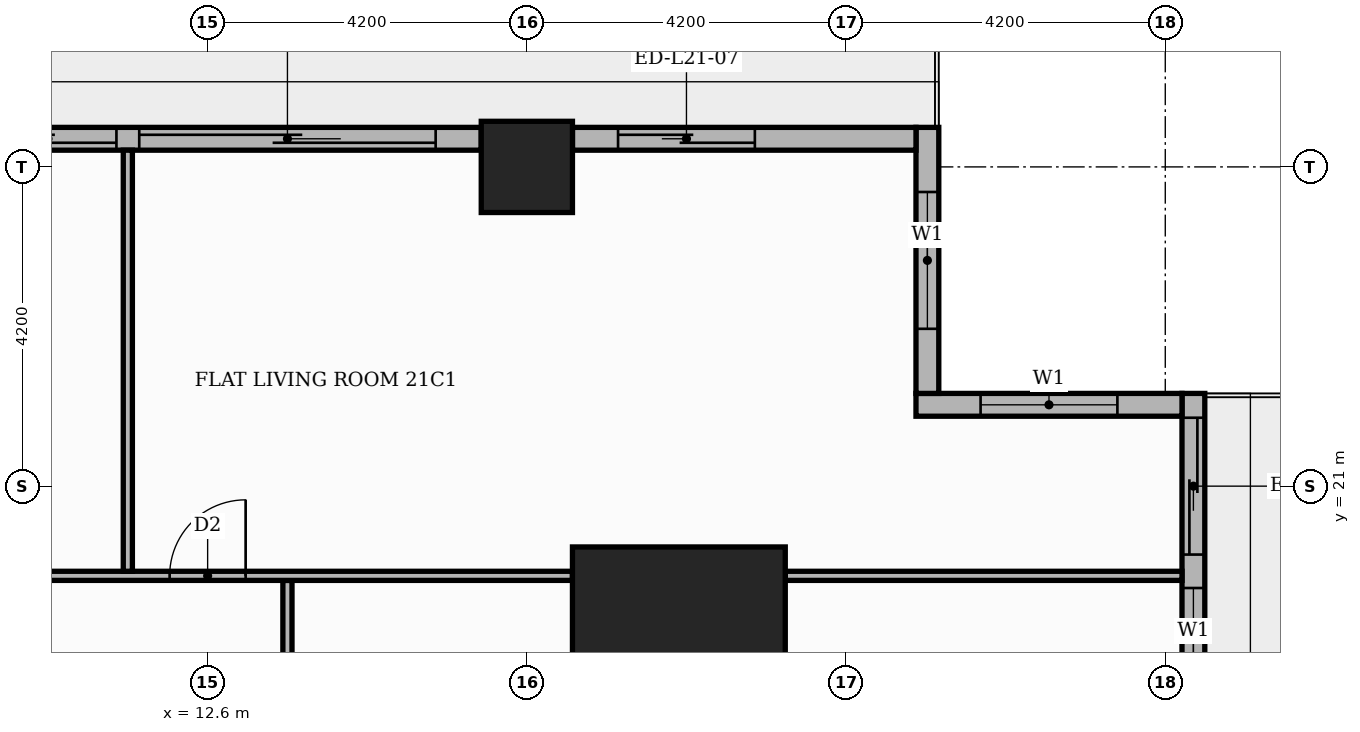
"""IFC4 building model, lengths in metres.
Left out: names, types, materials, properties, quantities, classifications, styles, units other than length and angle.
Written with IfcOpenShell. Run it as: python <this file> out.ifc"""

import sys

from ifc_helpers import new_model, si_unit, direction, frame, frame_2d, origin, origin_2d, place, context, subcontext, project, spatial, rectangle, extrude, element, fill, save


model = new_model("IFC4")
c1 = context("Model", 3, precision=1e-05, world=origin(), true_north=direction((0.0, 1.0)))
c2 = subcontext(c1, "Body", "Model", "MODEL_VIEW")
j1 = project(units=[si_unit("LENGTHUNIT", "METRE"), si_unit("PLANEANGLEUNIT", "RADIAN")], contexts=[c1])
p1 = place(None, origin())
s1 = spatial("IfcSite", under=j1, at=p1, CompositionType="ELEMENT")
p2 = place(p1, origin())
s2 = spatial("IfcBuilding", under=s1, at=p2, CompositionType="ELEMENT")
p3 = place(p2, frame((0.0, 0.0, 90.9)))
s3 = spatial("IfcBuildingStorey", under=s2, at=p3, CompositionType="ELEMENT", Elevation=90.9)
p4 = place(p3, frame((18.8, 18.8, 0.0), z_axis=(0.0, 0.0, 1.0), x_axis=(1.0, 0.0, 0.0)))
e1 = element("IfcColumn", 1, at=p4, inside=s3, PredefinedType="COLUMN", context=c2, shape_type="SweptSolid", body=[
    extrude(rectangle(XDim=2.8, YDim=2.8, at=origin_2d()), origin(), (0.0, 0.0, 1.0), 3.9),
])
p5 = place(p3, frame((16.8, 25.2, 0.0), z_axis=(0.0, 0.0, 1.0), x_axis=(1.0, 0.0, 0.0)))
e2 = element("IfcColumn", 2, at=p5, inside=s3, PredefinedType="COLUMN", context=c2, shape_type="SweptSolid", body=[
    extrude(rectangle(XDim=1.2, YDim=1.2, at=origin_2d()), origin(), (0.0, 0.0, 1.0), 3.9),
])
p6 = place(p3, frame((25.57, 17.4, 0.0), z_axis=(0.0, 0.0, 1.0), x_axis=(0.0, 1.0, 0.0)))
e3 = element("IfcWall", 3, at=p6, inside=s3, PredefinedType="STANDARD", context=c2, shape_type="SweptSolid", body=[
    extrude(rectangle(XDim=4.82, YDim=0.3, at=frame_2d((2.41, 0.0))), origin(), (0.0, 0.0, 1.0), 3.48),
])
p7 = place(p6, frame((2.7, 0.0, 0.0)))
e4 = element("IfcOpeningElement", 4, at=p7, cuts=e3, PredefinedType="OPENING", context=c2, shape_type="SweptSolid", body=[
    extrude(rectangle(XDim=1.8, YDim=2.4, at=frame_2d((0.9, 1.2))), frame((0.0, 0.16, 0.0), z_axis=(0.0, -1.0, 0.0), x_axis=(1.0, 0.0, 0.0)), (0.0, 0.0, 1.0), 0.32),
])
p8 = place(p6, frame((0.46, 0.0, 0.9)))
e5 = element("IfcOpeningElement", 5, at=p8, cuts=e3, PredefinedType="OPENING", context=c2, shape_type="SweptSolid", body=[
    extrude(rectangle(XDim=1.8, YDim=2.1, at=frame_2d((0.9, 1.05))), frame((0.0, 0.16, 0.0), z_axis=(0.0, -1.0, 0.0), x_axis=(1.0, 0.0, 0.0)), (0.0, 0.0, 1.0), 0.32),
])
p9 = place(p3, frame((25.42, 22.07, 0.0), z_axis=(0.0, 0.0, 1.0), x_axis=(-1.0, 0.0, 0.0)))
e6 = element("IfcWall", 6, at=p9, inside=s3, PredefinedType="STANDARD", context=c2, shape_type="SweptSolid", body=[
    extrude(rectangle(XDim=3.5, YDim=0.3, at=frame_2d((1.75, 0.0))), origin(), (0.0, 0.0, 1.0), 3.48),
])
p10 = place(p9, frame((0.85, 0.0, 0.9)))
e7 = element("IfcOpeningElement", 7, at=p10, cuts=e6, PredefinedType="OPENING", context=c2, shape_type="SweptSolid", body=[
    extrude(rectangle(XDim=1.8, YDim=2.1, at=frame_2d((0.9, 1.05))), frame((0.0, 0.16, 0.0), z_axis=(0.0, -1.0, 0.0), x_axis=(1.0, 0.0, 0.0)), (0.0, 0.0, 1.0), 0.32),
])
p11 = place(p3, frame((22.07, 22.22, 0.0), z_axis=(0.0, 0.0, 1.0), x_axis=(0.0, 1.0, 0.0)))
e8 = element("IfcWall", 8, at=p11, inside=s3, PredefinedType="STANDARD", context=c2, shape_type="SweptSolid", body=[
    extrude(rectangle(XDim=3.5, YDim=0.3, at=frame_2d((1.75, 0.0))), origin(), (0.0, 0.0, 1.0), 3.48),
])
p12 = place(p11, frame((0.85, 0.0, 0.9)))
e9 = element("IfcOpeningElement", 9, at=p12, cuts=e8, PredefinedType="OPENING", context=c2, shape_type="SweptSolid", body=[
    extrude(rectangle(XDim=1.8, YDim=2.1, at=frame_2d((0.9, 1.05))), frame((0.0, 0.16, 0.0), z_axis=(0.0, -1.0, 0.0), x_axis=(1.0, 0.0, 0.0)), (0.0, 0.0, 1.0), 0.32),
])
p13 = place(p3, frame((21.92, 25.57, 0.0), z_axis=(0.0, 0.0, 1.0), x_axis=(-1.0, 0.0, 0.0)))
e10 = element("IfcWall", 10, at=p13, inside=s3, PredefinedType="STANDARD", context=c2, shape_type="SweptSolid", body=[
    extrude(rectangle(XDim=4.52, YDim=0.3, at=frame_2d((2.26, 0.0))), origin(), (0.0, 0.0, 1.0), 3.48),
])
p14 = place(p13, frame((2.12, 0.0, 0.0)))
e11 = element("IfcOpeningElement", 11, at=p14, cuts=e10, PredefinedType="OPENING", context=c2, shape_type="SweptSolid", body=[
    extrude(rectangle(XDim=1.8, YDim=2.4, at=frame_2d((0.9, 1.2))), frame((0.0, 0.16, 0.0), z_axis=(0.0, -1.0, 0.0), x_axis=(1.0, 0.0, 0.0)), (0.0, 0.0, 1.0), 0.32),
])
p15 = place(p3, frame((16.2, 25.57, 0.0), z_axis=(0.0, 0.0, 1.0), x_axis=(-1.0, 0.0, 0.0)))
e12 = element("IfcWall", 12, at=p15, inside=s3, PredefinedType="STANDARD", context=c2, shape_type="SweptSolid", body=[
    extrude(rectangle(XDim=7.2, YDim=0.3, at=frame_2d((3.6, 0.0))), origin(), (0.0, 0.0, 1.0), 3.48),
])
p16 = place(p15, frame((0.6, 0.0, 0.0)))
e13 = element("IfcOpeningElement", 13, at=p16, cuts=e12, PredefinedType="OPENING", context=c2, shape_type="SweptSolid", body=[
    extrude(rectangle(XDim=3.9, YDim=2.4, at=frame_2d((1.95, 1.2))), frame((0.0, 0.16, 0.0), z_axis=(0.0, -1.0, 0.0), x_axis=(1.0, 0.0, 0.0)), (0.0, 0.0, 1.0), 0.32),
])
p17 = place(p15, frame((4.8, 0.0, 0.0)))
e14 = element("IfcOpeningElement", 14, at=p17, cuts=e12, PredefinedType="OPENING", context=c2, shape_type="SweptSolid", body=[
    extrude(rectangle(XDim=1.8, YDim=2.4, at=frame_2d((0.9, 1.2))), frame((0.0, 0.16, 0.0), z_axis=(0.0, -1.0, 0.0), x_axis=(1.0, 0.0, 0.0)), (0.0, 0.0, 1.0), 0.32),
])
p18 = place(p3, frame((13.65, 13.75, 0.0), z_axis=(0.0, 0.0, 1.0), x_axis=(0.0, 1.0, 0.0)))
e15 = element("IfcWall", 15, at=p18, inside=s3, PredefinedType="PARTITIONING", context=c2, shape_type="SweptSolid", body=[
    extrude(rectangle(XDim=6.01, YDim=0.12, at=frame_2d((3.005, 0.0))), origin(), (0.0, 0.0, 1.0), 3.48),
])
p19 = place(p18, frame((2.535, 0.0, 0.0)))
e16 = element("IfcOpeningElement", 16, at=p19, cuts=e15, PredefinedType="OPENING", context=c2, shape_type="SweptSolid", body=[
    extrude(rectangle(XDim=0.9, YDim=2.1, at=frame_2d((0.45, 1.05))), frame((0.0, 0.07, 0.0), z_axis=(0.0, -1.0, 0.0), x_axis=(1.0, 0.0, 0.0)), (0.0, 0.0, 1.0), 0.14),
])
p20 = place(p3, frame((-13.55, 19.82, 0.0), z_axis=(0.0, 0.0, 1.0), x_axis=(1.0, 0.0, 0.0)))
e17 = element("IfcWall", 17, at=p20, inside=s3, PredefinedType="PARTITIONING", context=c2, shape_type="SweptSolid", body=[
    extrude(rectangle(XDim=30.95, YDim=0.12, at=frame_2d((15.475, 0.0))), origin(), (0.0, 0.0, 1.0), 3.48),
])
p21 = place(p20, frame((25.65, 0.0, 0.0)))
e18 = element("IfcOpeningElement", 18, at=p21, cuts=e17, PredefinedType="OPENING", context=c2, shape_type="SweptSolid", body=[
    extrude(rectangle(XDim=1.0, YDim=2.1, at=frame_2d((0.5, 1.05))), frame((0.0, 0.07, 0.0), z_axis=(0.0, -1.0, 0.0), x_axis=(1.0, 0.0, 0.0)), (0.0, 0.0, 1.0), 0.14),
])
p22 = place(p20, frame((20.4, 0.0, 0.0)))
e19 = element("IfcOpeningElement", 19, at=p22, cuts=e17, PredefinedType="OPENING", context=c2, shape_type="SweptSolid", body=[
    extrude(rectangle(XDim=1.0, YDim=2.1, at=frame_2d((0.5, 1.05))), frame((0.0, 0.07, 0.0), z_axis=(0.0, -1.0, 0.0), x_axis=(1.0, 0.0, 0.0)), (0.0, 0.0, 1.0), 0.14),
])
p23 = place(p20, frame((13.1, 0.0, 0.0)))
e20 = element("IfcOpeningElement", 20, at=p23, cuts=e17, PredefinedType="OPENING", context=c2, shape_type="SweptSolid", body=[
    extrude(rectangle(XDim=0.9, YDim=2.1, at=frame_2d((0.45, 1.05))), frame((0.0, 0.07, 0.0), z_axis=(0.0, -1.0, 0.0), x_axis=(1.0, 0.0, 0.0)), (0.0, 0.0, 1.0), 0.14),
])
p24 = place(p20, frame((3.65, 0.0, 0.0)))
e21 = element("IfcOpeningElement", 21, at=p24, cuts=e17, PredefinedType="OPENING", context=c2, shape_type="SweptSolid", body=[
    extrude(rectangle(XDim=0.9, YDim=2.1, at=frame_2d((0.45, 1.05))), frame((0.0, 0.07, 0.0), z_axis=(0.0, -1.0, 0.0), x_axis=(1.0, 0.0, 0.0)), (0.0, 0.0, 1.0), 0.14),
])
p25 = place(p3, frame((20.2, 19.82, 0.0), z_axis=(0.0, 0.0, 1.0), x_axis=(1.0, 0.0, 0.0)))
e22 = element("IfcWall", 22, at=p25, inside=s3, PredefinedType="PARTITIONING", context=c2, shape_type="SweptSolid", body=[
    extrude(rectangle(XDim=5.22, YDim=0.12, at=frame_2d((2.61, 0.0))), origin(), (0.0, 0.0, 1.0), 3.48),
])
p26 = place(p3, frame((11.55, 19.88, 0.0), z_axis=(0.0, 0.0, 1.0), x_axis=(0.0, 1.0, 0.0)))
e23 = element("IfcWall", 23, at=p26, inside=s3, PredefinedType="PARTITIONING", context=c2, shape_type="SweptSolid", body=[
    extrude(rectangle(XDim=5.54, YDim=0.12, at=frame_2d((2.77, 0.0))), origin(), (0.0, 0.0, 1.0), 3.48),
])
p27 = place(p7, origin())
e24 = element("IfcDoor", 24, at=p27, inside=s3, OperationType="SLIDING_TO_LEFT", PredefinedType="DOOR", context=c2, shape_type="SweptSolid", body=[
    extrude(rectangle(XDim=1.8, YDim=2.4, at=frame_2d((0.9, 1.2))), frame((0.0, 0.025, 0.0), z_axis=(0.0, -1.0, 0.0), x_axis=(1.0, 0.0, 0.0)), (0.0, 0.0, 1.0), 0.05),
])
fill(e4, e24)
p28 = place(p8, origin())
e25 = element("IfcWindow", 25, at=p28, inside=s3, PartitioningType="SINGLE_PANEL", PredefinedType="WINDOW", context=c2, shape_type="SweptSolid", body=[
    extrude(rectangle(XDim=1.8, YDim=2.1, at=frame_2d((0.9, 1.05))), frame((0.0, 0.03, 0.0), z_axis=(0.0, -1.0, 0.0), x_axis=(1.0, 0.0, 0.0)), (0.0, 0.0, 1.0), 0.06),
])
fill(e5, e25)
p29 = place(p10, origin())
e26 = element("IfcWindow", 26, at=p29, inside=s3, PartitioningType="SINGLE_PANEL", PredefinedType="WINDOW", context=c2, shape_type="SweptSolid", body=[
    extrude(rectangle(XDim=1.8, YDim=2.1, at=frame_2d((0.9, 1.05))), frame((0.0, 0.03, 0.0), z_axis=(0.0, -1.0, 0.0), x_axis=(1.0, 0.0, 0.0)), (0.0, 0.0, 1.0), 0.06),
])
fill(e7, e26)
p30 = place(p12, origin())
e27 = element("IfcWindow", 27, at=p30, inside=s3, PartitioningType="SINGLE_PANEL", PredefinedType="WINDOW", context=c2, shape_type="SweptSolid", body=[
    extrude(rectangle(XDim=1.8, YDim=2.1, at=frame_2d((0.9, 1.05))), frame((0.0, 0.03, 0.0), z_axis=(0.0, -1.0, 0.0), x_axis=(1.0, 0.0, 0.0)), (0.0, 0.0, 1.0), 0.06),
])
fill(e9, e27)
p31 = place(p14, origin())
e28 = element("IfcDoor", 28, at=p31, inside=s3, OperationType="SLIDING_TO_RIGHT", PredefinedType="DOOR", context=c2, shape_type="SweptSolid", body=[
    extrude(rectangle(XDim=1.8, YDim=2.4, at=frame_2d((0.9, 1.2))), frame((0.0, 0.025, 0.0), z_axis=(0.0, -1.0, 0.0), x_axis=(1.0, 0.0, 0.0)), (0.0, 0.0, 1.0), 0.05),
])
fill(e11, e28)
p32 = place(p16, origin())
e29 = element("IfcDoor", 29, at=p32, inside=s3, OperationType="SLIDING_TO_LEFT", PredefinedType="DOOR", context=c2, shape_type="SweptSolid", body=[
    extrude(rectangle(XDim=3.9, YDim=2.4, at=frame_2d((1.95, 1.2))), frame((0.0, 0.025, 0.0), z_axis=(0.0, -1.0, 0.0), x_axis=(1.0, 0.0, 0.0)), (0.0, 0.0, 1.0), 0.05),
])
fill(e13, e29)
p33 = place(p17, origin())
e30 = element("IfcDoor", 30, at=p33, inside=s3, OperationType="SLIDING_TO_RIGHT", PredefinedType="DOOR", context=c2, shape_type="SweptSolid", body=[
    extrude(rectangle(XDim=1.8, YDim=2.4, at=frame_2d((0.9, 1.2))), frame((0.0, 0.025, 0.0), z_axis=(0.0, -1.0, 0.0), x_axis=(1.0, 0.0, 0.0)), (0.0, 0.0, 1.0), 0.05),
])
fill(e14, e30)
p34 = place(p21, origin())
e31 = element("IfcDoor", 31, at=p34, inside=s3, OperationType="SINGLE_SWING_RIGHT", PredefinedType="DOOR", context=c2, shape_type="SweptSolid", body=[
    extrude(rectangle(XDim=1.0, YDim=2.1, at=frame_2d((0.5, 1.05))), frame((0.0, 0.025, 0.0), z_axis=(0.0, -1.0, 0.0), x_axis=(1.0, 0.0, 0.0)), (0.0, 0.0, 1.0), 0.05),
])
fill(e18, e31)
save(model, sys.argv[1])
